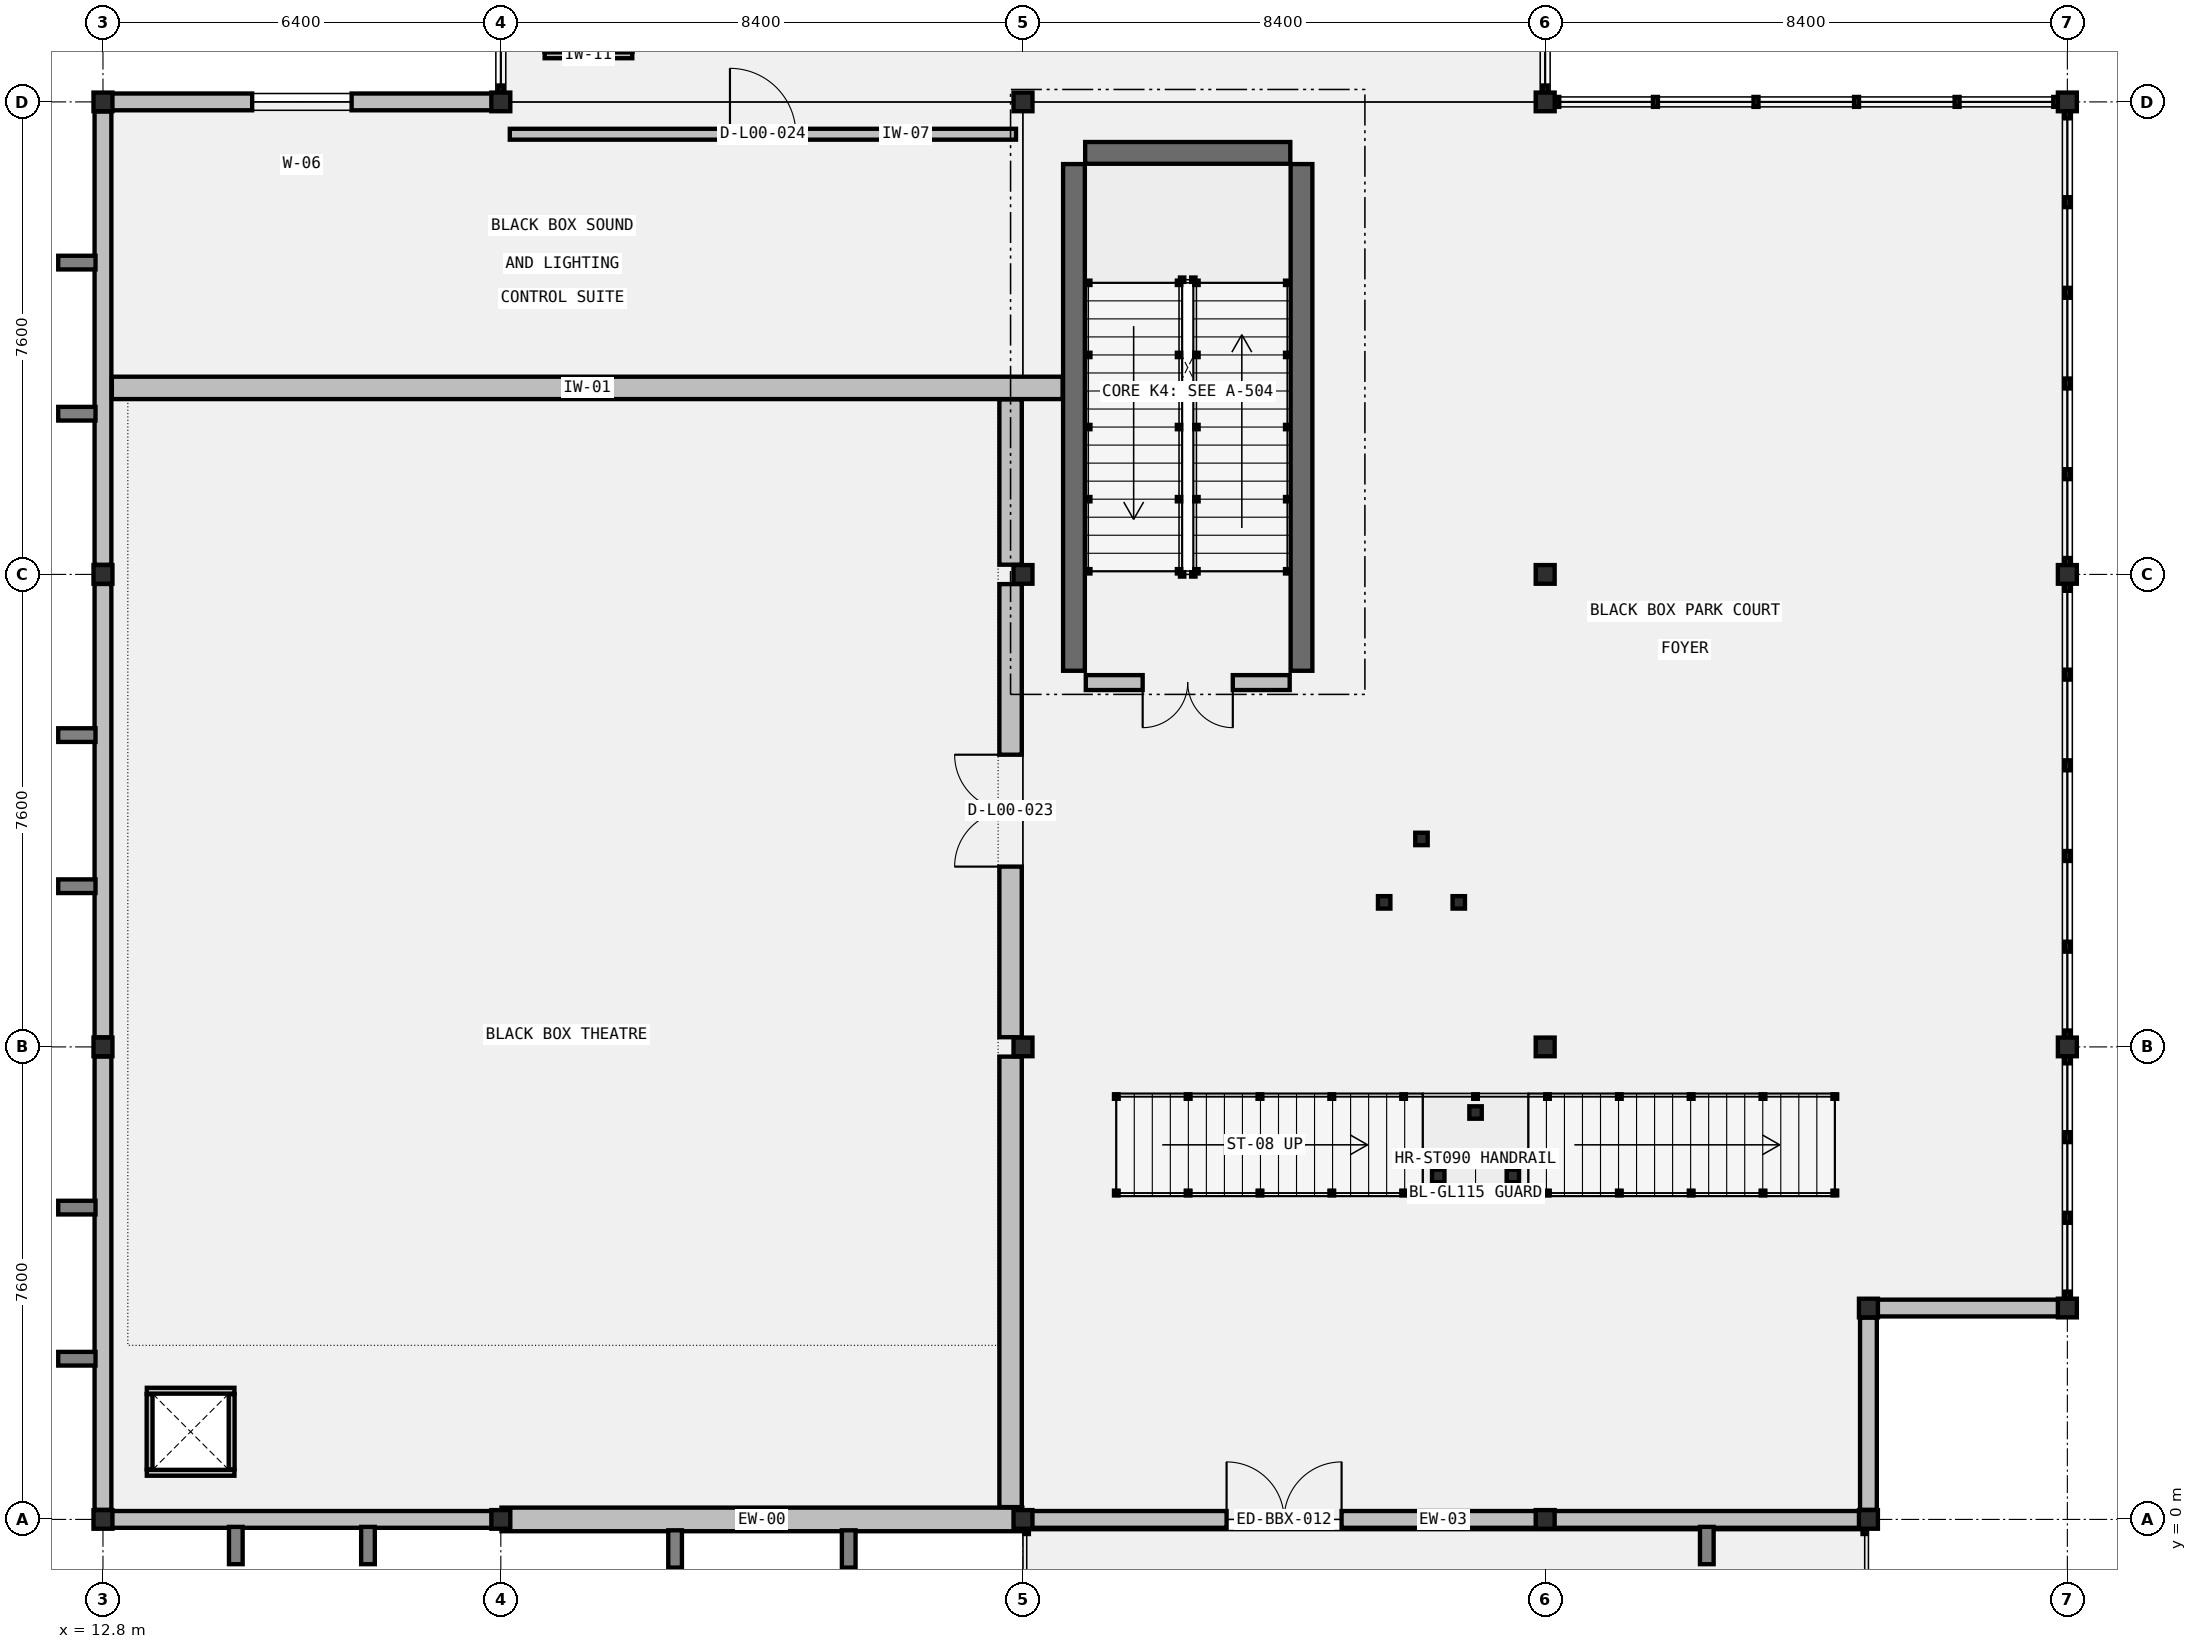
"""IFC4 building model, lengths in metres.
Left out: names, types, materials, properties, quantities, classifications, styles, units other than length and angle.
Written with IfcOpenShell. Run it as: python <this file> out.ifc"""

import sys

from ifc_helpers import new_model, si_unit, direction, frame, frame_2d, origin, origin_2d, place, context, subcontext, project, spatial, rectangle, i_section, extrude, element, fill, save


model = new_model("IFC4")
c1 = context("Model", 3, precision=1e-05, world=origin(), true_north=direction((0.0, 1.0)))
c2 = subcontext(c1, "Body", "Model", "MODEL_VIEW")
j1 = project(units=[si_unit("LENGTHUNIT", "METRE"), si_unit("PLANEANGLEUNIT", "RADIAN")], contexts=[c1])
p1 = place(None, origin())
s1 = spatial("IfcSite", under=j1, at=p1, CompositionType="ELEMENT")
p2 = place(p1, origin())
s2 = spatial("IfcBuilding", under=s1, at=p2, CompositionType="ELEMENT")
p3 = place(p2, origin())
s3 = spatial("IfcBuildingStorey", under=s2, at=p3, CompositionType="ELEMENT", Elevation=0.0)
for number, where, z_axis, x_axis in (
    (1, (12.8, 0.0, 0.0), (0.0, 0.0, 1.0), (1.0, 0.0, 0.0)),
    (2, (12.8, 7.6, 0.0), (0.0, 0.0, 1.0), (1.0, 0.0, 0.0)),
    (3, (12.8, 15.2, 0.0), (0.0, 0.0, 1.0), (1.0, 0.0, 0.0)),
    (4, (12.8, 22.8, 0.0), (0.0, 0.0, 1.0), (1.0, 0.0, 0.0)),
    (5, (19.2, 0.0, 0.0), (0.0, 0.0, 1.0), (1.0, 0.0, 0.0)),
    (6, (19.2, 22.8, 0.0), (0.0, 0.0, 1.0), (1.0, 0.0, 0.0)),
    (7, (27.6, 0.0, 0.0), (0.0, 0.0, 1.0), (1.0, 0.0, 0.0)),
    (8, (27.6, 7.6, 0.0), (0.0, 0.0, 1.0), (1.0, 0.0, 0.0)),
    (9, (27.6, 15.2, 0.0), (0.0, 0.0, 1.0), (1.0, 0.0, 0.0)),
    (10, (27.6, 22.8, 0.0), (0.0, 0.0, 1.0), (1.0, 0.0, 0.0)),
    (11, (36.0, 0.0, 0.0), (0.0, 0.0, 1.0), (1.0, 0.0, 0.0)),
    (12, (36.0, 7.6, 0.0), (0.0, 0.0, 1.0), (1.0, 0.0, 0.0)),
    (13, (36.0, 15.2, 0.0), (0.0, 0.0, 1.0), (1.0, 0.0, 0.0)),
    (14, (36.0, 22.8, 0.0), (0.0, 0.0, 1.0), (1.0, 0.0, 0.0)),
    (15, (44.4, 7.6, 0.0), (0.0, 0.0, 1.0), (1.0, 0.0, 0.0)),
    (16, (44.4, 15.2, 0.0), (0.0, 0.0, 1.0), (1.0, 0.0, 0.0)),
    (17, (44.4, 22.8, 0.0), (0.0, 0.0, 1.0), (1.0, 0.0, 0.0)),
    (18, (41.2, 0.0, 0.0), (0.0, 0.0, 1.0), (1.0, 0.0, 0.0)),
    (19, (41.2, 3.4, 0.0), (0.0, 0.0, 1.0), (1.0, 0.0, 0.0)),
    (20, (44.4, 3.4, 0.0), (0.0, 0.0, 1.0), (1.0, 0.0, 0.0)),
):
    element("IfcColumn", number, at=place(p3, frame(where, z_axis=z_axis, x_axis=x_axis)), inside=s3, PredefinedType="COLUMN", context=c2, shape_type="SweptSolid", body=[
        extrude(i_section(OverallWidth=0.305, OverallDepth=0.3, WebThickness=0.015, FlangeThickness=0.015, FilletRadius=0.018, at=origin_2d()), origin(), (0.0, 0.0, 1.0), 5.4),
    ])
p4 = place(p3, frame((32.08, 13.65, 0.0), z_axis=(0.0, 0.0, 1.0), x_axis=(0.0, 1.0, 0.0)))
e21 = element("IfcWall", 21, at=p4, inside=s3, PredefinedType="SHEAR", context=c2, shape_type="SweptSolid", body=[
    extrude(rectangle(XDim=8.15, YDim=0.35, at=frame_2d((4.075, 0.0))), origin(), (0.0, 0.0, 1.0), 5.16),
])
p5 = place(p3, frame((31.9, 21.98, 0.0), z_axis=(0.0, 0.0, 1.0), x_axis=(-1.0, 0.0, 0.0)))
e22 = element("IfcWall", 22, at=p5, inside=s3, PredefinedType="SHEAR", context=c2, shape_type="SweptSolid", body=[
    extrude(rectangle(XDim=3.3, YDim=0.35, at=frame_2d((1.65, 0.0))), origin(), (0.0, 0.0, 1.0), 5.16),
])
p6 = place(p3, frame((28.42, 21.8, 0.0), z_axis=(0.0, 0.0, 1.0), x_axis=(0.0, -1.0, 0.0)))
e23 = element("IfcWall", 23, at=p6, inside=s3, PredefinedType="SHEAR", context=c2, shape_type="SweptSolid", body=[
    extrude(rectangle(XDim=8.15, YDim=0.35, at=frame_2d((4.075, 0.0))), origin(), (0.0, 0.0, 1.0), 5.16),
])
p7 = place(p3, frame((12.811, 0.0, 0.0), z_axis=(0.0, 0.0, 1.0), x_axis=(1.0, 0.0, 0.0)))
e24 = element("IfcWall", 24, at=p7, inside=s3, PredefinedType="STANDARD", context=c2, shape_type="SweptSolid", body=[
    extrude(rectangle(XDim=6.379, YDim=0.27, at=frame_2d((3.189, 0.0))), origin(), (0.0, 0.0, 1.0), 4.556),
])
p8 = place(p3, frame((19.21, 0.0, 0.0), z_axis=(0.0, 0.0, 1.0), x_axis=(1.0, 0.0, 0.0)))
e25 = element("IfcWall", 25, at=p8, inside=s3, PredefinedType="STANDARD", context=c2, shape_type="SweptSolid", body=[
    extrude(rectangle(XDim=8.379, YDim=0.38, at=frame_2d((4.189, 0.0))), origin(), (0.0, 0.0, 1.0), 4.556),
])
p9 = place(p3, frame((27.611, 0.0, 0.0), z_axis=(0.0, 0.0, 1.0), x_axis=(1.0, 0.0, 0.0)))
e26 = element("IfcWall", 26, at=p9, inside=s3, PredefinedType="STANDARD", context=c2, shape_type="SweptSolid", body=[
    extrude(rectangle(XDim=8.379, YDim=0.27, at=frame_2d((4.189, 0.0))), origin(), (0.0, 0.0, 1.0), 4.556),
])
p10 = place(p9, frame((3.264, 0.0, 0.0)))
e27 = element("IfcOpeningElement", 27, at=p10, cuts=e26, PredefinedType="OPENING", context=c2, shape_type="SweptSolid", body=[
    extrude(rectangle(XDim=1.85, YDim=2.35, at=frame_2d((0.925, 1.175))), frame((0.0, 0.145, 0.0), z_axis=(0.0, -1.0, 0.0), x_axis=(1.0, 0.0, 0.0)), (0.0, 0.0, 1.0), 0.29),
])
p11 = place(p3, frame((36.01, 0.0, 0.0), z_axis=(0.0, 0.0, 1.0), x_axis=(1.0, 0.0, 0.0)))
e28 = element("IfcWall", 28, at=p11, inside=s3, PredefinedType="STANDARD", context=c2, shape_type="SweptSolid", body=[
    extrude(rectangle(XDim=5.179, YDim=0.27, at=frame_2d((2.589, 0.0))), origin(), (0.0, 0.0, 1.0), 4.556),
])
p12 = place(p3, frame((12.8, 0.154, 0.0), z_axis=(0.0, 0.0, 1.0), x_axis=(0.0, 1.0, 0.0)))
e29 = element("IfcWall", 29, at=p12, inside=s3, PredefinedType="STANDARD", context=c2, shape_type="SweptSolid", body=[
    extrude(rectangle(XDim=7.292, YDim=0.27, at=frame_2d((3.646, 0.0))), origin(), (0.0, 0.0, 1.0), 4.556),
])
p13 = place(p3, frame((12.8, 7.754, 0.0), z_axis=(0.0, 0.0, 1.0), x_axis=(0.0, 1.0, 0.0)))
e30 = element("IfcWall", 30, at=p13, inside=s3, PredefinedType="STANDARD", context=c2, shape_type="SweptSolid", body=[
    extrude(rectangle(XDim=7.292, YDim=0.27, at=frame_2d((3.646, 0.0))), origin(), (0.0, 0.0, 1.0), 4.698),
])
p14 = place(p3, frame((12.8, 15.354, 0.0), z_axis=(0.0, 0.0, 1.0), x_axis=(0.0, 1.0, 0.0)))
e31 = element("IfcWall", 31, at=p14, inside=s3, PredefinedType="STANDARD", context=c2, shape_type="SweptSolid", body=[
    extrude(rectangle(XDim=7.292, YDim=0.27, at=frame_2d((3.646, 0.0))), origin(), (0.0, 0.0, 1.0), 4.556),
])
p15 = place(p3, frame((41.2, 0.154, 0.0), z_axis=(0.0, 0.0, 1.0), x_axis=(0.0, 1.0, 0.0)))
e32 = element("IfcWall", 32, at=p15, inside=s3, PredefinedType="STANDARD", context=c2, shape_type="SweptSolid", body=[
    extrude(rectangle(XDim=3.092, YDim=0.27, at=frame_2d((1.546, 0.0))), origin(), (0.0, 0.0, 1.0), 4.556),
])
p16 = place(p3, frame((41.21, 3.4, 0.0), z_axis=(0.0, 0.0, 1.0), x_axis=(1.0, 0.0, 0.0)))
e33 = element("IfcWall", 33, at=p16, inside=s3, PredefinedType="STANDARD", context=c2, shape_type="SweptSolid", body=[
    extrude(rectangle(XDim=3.179, YDim=0.27, at=frame_2d((1.589, 0.0))), origin(), (0.0, 0.0, 1.0), 4.556),
])
p17 = place(p3, frame((12.811, 22.8, 0.0), z_axis=(0.0, 0.0, 1.0), x_axis=(1.0, 0.0, 0.0)))
e34 = element("IfcWall", 34, at=p17, inside=s3, PredefinedType="STANDARD", context=c2, shape_type="SweptSolid", body=[
    extrude(rectangle(XDim=6.379, YDim=0.27, at=frame_2d((3.189, 0.0))), origin(), (0.0, 0.0, 1.0), 4.556),
])
p18 = place(p17, frame((2.389, 0.0, 0.95)))
e35 = element("IfcOpeningElement", 35, at=p18, cuts=e34, PredefinedType="OPENING", context=c2, shape_type="SweptSolid", body=[
    extrude(rectangle(XDim=1.6, YDim=1.8, at=frame_2d((0.8, 0.9))), frame((0.0, 0.145, 0.0), z_axis=(0.0, -1.0, 0.0), x_axis=(1.0, 0.0, 0.0)), (0.0, 0.0, 1.0), 0.29),
])
for number, where, z_axis, x_axis in (
    (36, (13.505, 0.75, 0.0), (0.0, 0.0, 1.0), (1.0, 0.0, 0.0)),
    (37, (13.505, 2.07, 0.0), (0.0, 0.0, 1.0), (1.0, 0.0, 0.0)),
):
    element("IfcWall", number, at=place(p3, frame(where, z_axis=z_axis, x_axis=x_axis)), inside=s3, PredefinedType="PARTITIONING", context=c2, shape_type="SweptSolid", body=[
        extrude(rectangle(XDim=1.41, YDim=0.095, at=frame_2d((0.705, 0.0))), origin(), (0.0, 0.0, 1.0), 5.16),
    ])
for number, where, z_axis, x_axis in (
    (38, (13.55, 0.805, 0.0), (0.0, 0.0, 1.0), (0.0, 1.0, 0.0)),
    (39, (14.87, 0.805, 0.0), (0.0, 0.0, 1.0), (0.0, 1.0, 0.0)),
):
    element("IfcWall", number, at=place(p3, frame(where, z_axis=z_axis, x_axis=x_axis)), inside=s3, PredefinedType="PARTITIONING", context=c2, shape_type="SweptSolid", body=[
        extrude(rectangle(XDim=1.21, YDim=0.095, at=frame_2d((0.605, 0.0))), origin(), (0.0, 0.0, 1.0), 5.16),
    ])
p19 = place(p3, frame((19.905, 23.55, 0.0), z_axis=(0.0, 0.0, 1.0), x_axis=(1.0, 0.0, 0.0)))
e40 = element("IfcWall", 40, at=p19, inside=s3, PredefinedType="PARTITIONING", context=c2, shape_type="SweptSolid", body=[
    extrude(rectangle(XDim=1.41, YDim=0.095, at=frame_2d((0.705, 0.0))), origin(), (0.0, 0.0, 1.0), 4.588),
])
p20 = place(p3, frame((31.89, 13.46, 0.0), z_axis=(0.0, 0.0, 1.0), x_axis=(-1.0, 0.0, 0.0)))
e41 = element("IfcWall", 41, at=p20, inside=s3, PredefinedType="STANDARD", context=c2, shape_type="SweptSolid", body=[
    extrude(rectangle(XDim=3.28, YDim=0.24, at=frame_2d((1.64, 0.0))), origin(), (0.0, 0.0, 1.0), 5.16),
])
p21 = place(p20, frame((0.915, 0.0, 0.0)))
e42 = element("IfcOpeningElement", 42, at=p21, cuts=e41, PredefinedType="OPENING", context=c2, shape_type="SweptSolid", body=[
    extrude(rectangle(XDim=1.45, YDim=2.2, at=frame_2d((0.725, 1.1))), frame((0.0, 0.13, 0.0), z_axis=(0.0, -1.0, 0.0), x_axis=(1.0, 0.0, 0.0)), (0.0, 0.0, 1.0), 0.26),
])
for number, where, z_axis, x_axis in (
    (43, (34.28, 5.525, 0.0), (0.0, 0.0, 1.0), (1.0, 0.0, 0.0)),
    (44, (35.48, 5.525, 0.0), (0.0, 0.0, 1.0), (1.0, 0.0, 0.0)),
    (45, (34.88, 6.545, 0.0), (0.0, 0.0, 1.0), (1.0, 0.0, 0.0)),
):
    element("IfcColumn", number, at=place(p3, frame(where, z_axis=z_axis, x_axis=x_axis)), inside=s3, PredefinedType="COLUMN", context=c2, shape_type="SweptSolid", body=[
        extrude(i_section(OverallWidth=0.2, OverallDepth=0.2, WebThickness=0.008, FlangeThickness=0.012, FilletRadius=0.013, at=origin_2d()), origin(), (0.0, 0.0, 1.0), 2.53),
    ])
for number, where, z_axis, x_axis in (
    (46, (33.41, 9.925, 0.0), (0.0, 0.0, 1.0), (1.0, 0.0, 0.0)),
    (47, (34.61, 9.925, 0.0), (0.0, 0.0, 1.0), (1.0, 0.0, 0.0)),
    (48, (34.01, 10.945, 0.0), (0.0, 0.0, 1.0), (1.0, 0.0, 0.0)),
):
    element("IfcColumn", number, at=place(p3, frame(where, z_axis=z_axis, x_axis=x_axis)), inside=s3, PredefinedType="COLUMN", context=c2, shape_type="SweptSolid", body=[
        extrude(i_section(OverallWidth=0.2, OverallDepth=0.2, WebThickness=0.008, FlangeThickness=0.012, FilletRadius=0.013, at=origin_2d()), origin(), (0.0, 0.0, 1.0), 5.4),
    ])
p22 = place(p3, frame((12.943, 18.2, 0.0), z_axis=(0.0, 0.0, 1.0), x_axis=(1.0, 0.0, 0.0)))
e49 = element("IfcWall", 49, at=p22, inside=s3, PredefinedType="PARTITIONING", context=c2, shape_type="SweptSolid", body=[
    extrude(rectangle(XDim=15.294, YDim=0.36, at=frame_2d((7.647, 0.0))), origin(), (0.0, 0.0, 1.0), 4.698),
])
p23 = place(p3, frame((27.4, 7.756, 0.0), z_axis=(0.0, 0.0, 1.0), x_axis=(0.0, 1.0, 0.0)))
e50 = element("IfcWall", 50, at=p23, inside=s3, PredefinedType="PARTITIONING", context=c2, shape_type="SweptSolid", body=[
    extrude(rectangle(XDim=7.288, YDim=0.36, at=frame_2d((3.644, 0.0))), origin(), (0.0, 0.0, 1.0), 4.698),
])
p24 = place(p23, frame((2.744, 0.0, 0.0)))
e51 = element("IfcOpeningElement", 51, at=p24, cuts=e50, PredefinedType="OPENING", context=c2, shape_type="SweptSolid", body=[
    extrude(rectangle(XDim=1.8, YDim=2.4, at=frame_2d((0.9, 1.2))), frame((0.0, 0.19, 0.0), z_axis=(0.0, -1.0, 0.0), x_axis=(1.0, 0.0, 0.0)), (0.0, 0.0, 1.0), 0.38),
])
p25 = place(p3, frame((27.4, 15.356, 0.0), z_axis=(0.0, 0.0, 1.0), x_axis=(0.0, 1.0, 0.0)))
e52 = element("IfcWall", 52, at=p25, inside=s3, PredefinedType="PARTITIONING", context=c2, shape_type="SweptSolid", body=[
    extrude(rectangle(XDim=2.658, YDim=0.36, at=frame_2d((1.329, 0.0))), origin(), (0.0, 0.0, 1.0), 4.698),
])
p26 = place(p3, frame((27.4, 0.198, 0.0), z_axis=(0.0, 0.0, 1.0), x_axis=(0.0, 1.0, 0.0)))
e53 = element("IfcWall", 53, at=p26, inside=s3, PredefinedType="PARTITIONING", context=c2, shape_type="SweptSolid", body=[
    extrude(rectangle(XDim=7.246, YDim=0.36, at=frame_2d((3.623, 0.0))), origin(), (0.0, 0.0, 1.0), 4.556),
])
p27 = place(p3, frame((19.344, 22.28, 0.0), z_axis=(0.0, 0.0, 1.0), x_axis=(1.0, 0.0, 0.0)))
e54 = element("IfcWall", 54, at=p27, inside=s3, PredefinedType="PARTITIONING", context=c2, shape_type="SweptSolid", body=[
    extrude(rectangle(XDim=8.143, YDim=0.175, at=frame_2d((4.072, 0.0))), origin(), (0.0, 0.0, 1.0), 4.698),
])
p28 = place(p27, frame((3.542, 0.0, 0.0)))
e55 = element("IfcOpeningElement", 55, at=p28, cuts=e54, PredefinedType="OPENING", context=c2, shape_type="SweptSolid", body=[
    extrude(rectangle(XDim=1.06, YDim=2.15, at=frame_2d((0.53, 1.075))), frame((0.0, 0.097, 0.0), z_axis=(0.0, -1.0, 0.0), x_axis=(1.0, 0.0, 0.0)), (0.0, 0.0, 1.0), 0.195),
])
p29 = place(p10, origin())
e56 = element("IfcDoor", 56, at=p29, inside=s3, OperationType="DOUBLE_DOOR_SINGLE_SWING", PredefinedType="DOOR", context=c2, shape_type="SweptSolid", body=[
    extrude(rectangle(XDim=1.85, YDim=2.35, at=frame_2d((0.925, 1.175))), frame((0.0, 0.025, 0.0), z_axis=(0.0, -1.0, 0.0), x_axis=(1.0, 0.0, 0.0)), (0.0, 0.0, 1.0), 0.05),
])
fill(e27, e56)
p30 = place(p18, origin())
e57 = element("IfcWindow", 57, at=p30, inside=s3, PartitioningType="DOUBLE_PANEL_VERTICAL", PredefinedType="WINDOW", context=c2, shape_type="SweptSolid", body=[
    extrude(rectangle(XDim=1.6, YDim=1.8, at=frame_2d((0.8, 0.9))), frame((0.0, 0.03, 0.0), z_axis=(0.0, -1.0, 0.0), x_axis=(1.0, 0.0, 0.0)), (0.0, 0.0, 1.0), 0.06),
])
fill(e35, e57)
p31 = place(p21, origin())
e58 = element("IfcDoor", 58, at=p31, inside=s3, OperationType="DOUBLE_DOOR_SINGLE_SWING", PredefinedType="DOOR", context=c2, shape_type="SweptSolid", body=[
    extrude(rectangle(XDim=1.45, YDim=2.2, at=frame_2d((0.725, 1.1))), frame((0.0, 0.025, 0.0), z_axis=(0.0, -1.0, 0.0), x_axis=(1.0, 0.0, 0.0)), (0.0, 0.0, 1.0), 0.05),
])
fill(e42, e58)
p32 = place(p24, origin())
e59 = element("IfcDoor", 59, at=p32, inside=s3, OperationType="DOUBLE_DOOR_SINGLE_SWING", PredefinedType="DOOR", context=c2, shape_type="SweptSolid", body=[
    extrude(rectangle(XDim=1.8, YDim=2.4, at=frame_2d((0.9, 1.2))), frame((0.0, 0.025, 0.0), z_axis=(0.0, -1.0, 0.0), x_axis=(1.0, 0.0, 0.0)), (0.0, 0.0, 1.0), 0.05),
])
fill(e51, e59)
p33 = place(p28, origin())
e60 = element("IfcDoor", 60, at=p33, inside=s3, OperationType="SINGLE_SWING_LEFT", PredefinedType="DOOR", context=c2, shape_type="SweptSolid", body=[
    extrude(rectangle(XDim=1.06, YDim=2.15, at=frame_2d((0.53, 1.075))), frame((0.0, 0.025, 0.0), z_axis=(0.0, -1.0, 0.0), x_axis=(1.0, 0.0, 0.0)), (0.0, 0.0, 1.0), 0.05),
])
fill(e55, e60)
save(model, sys.argv[1])
